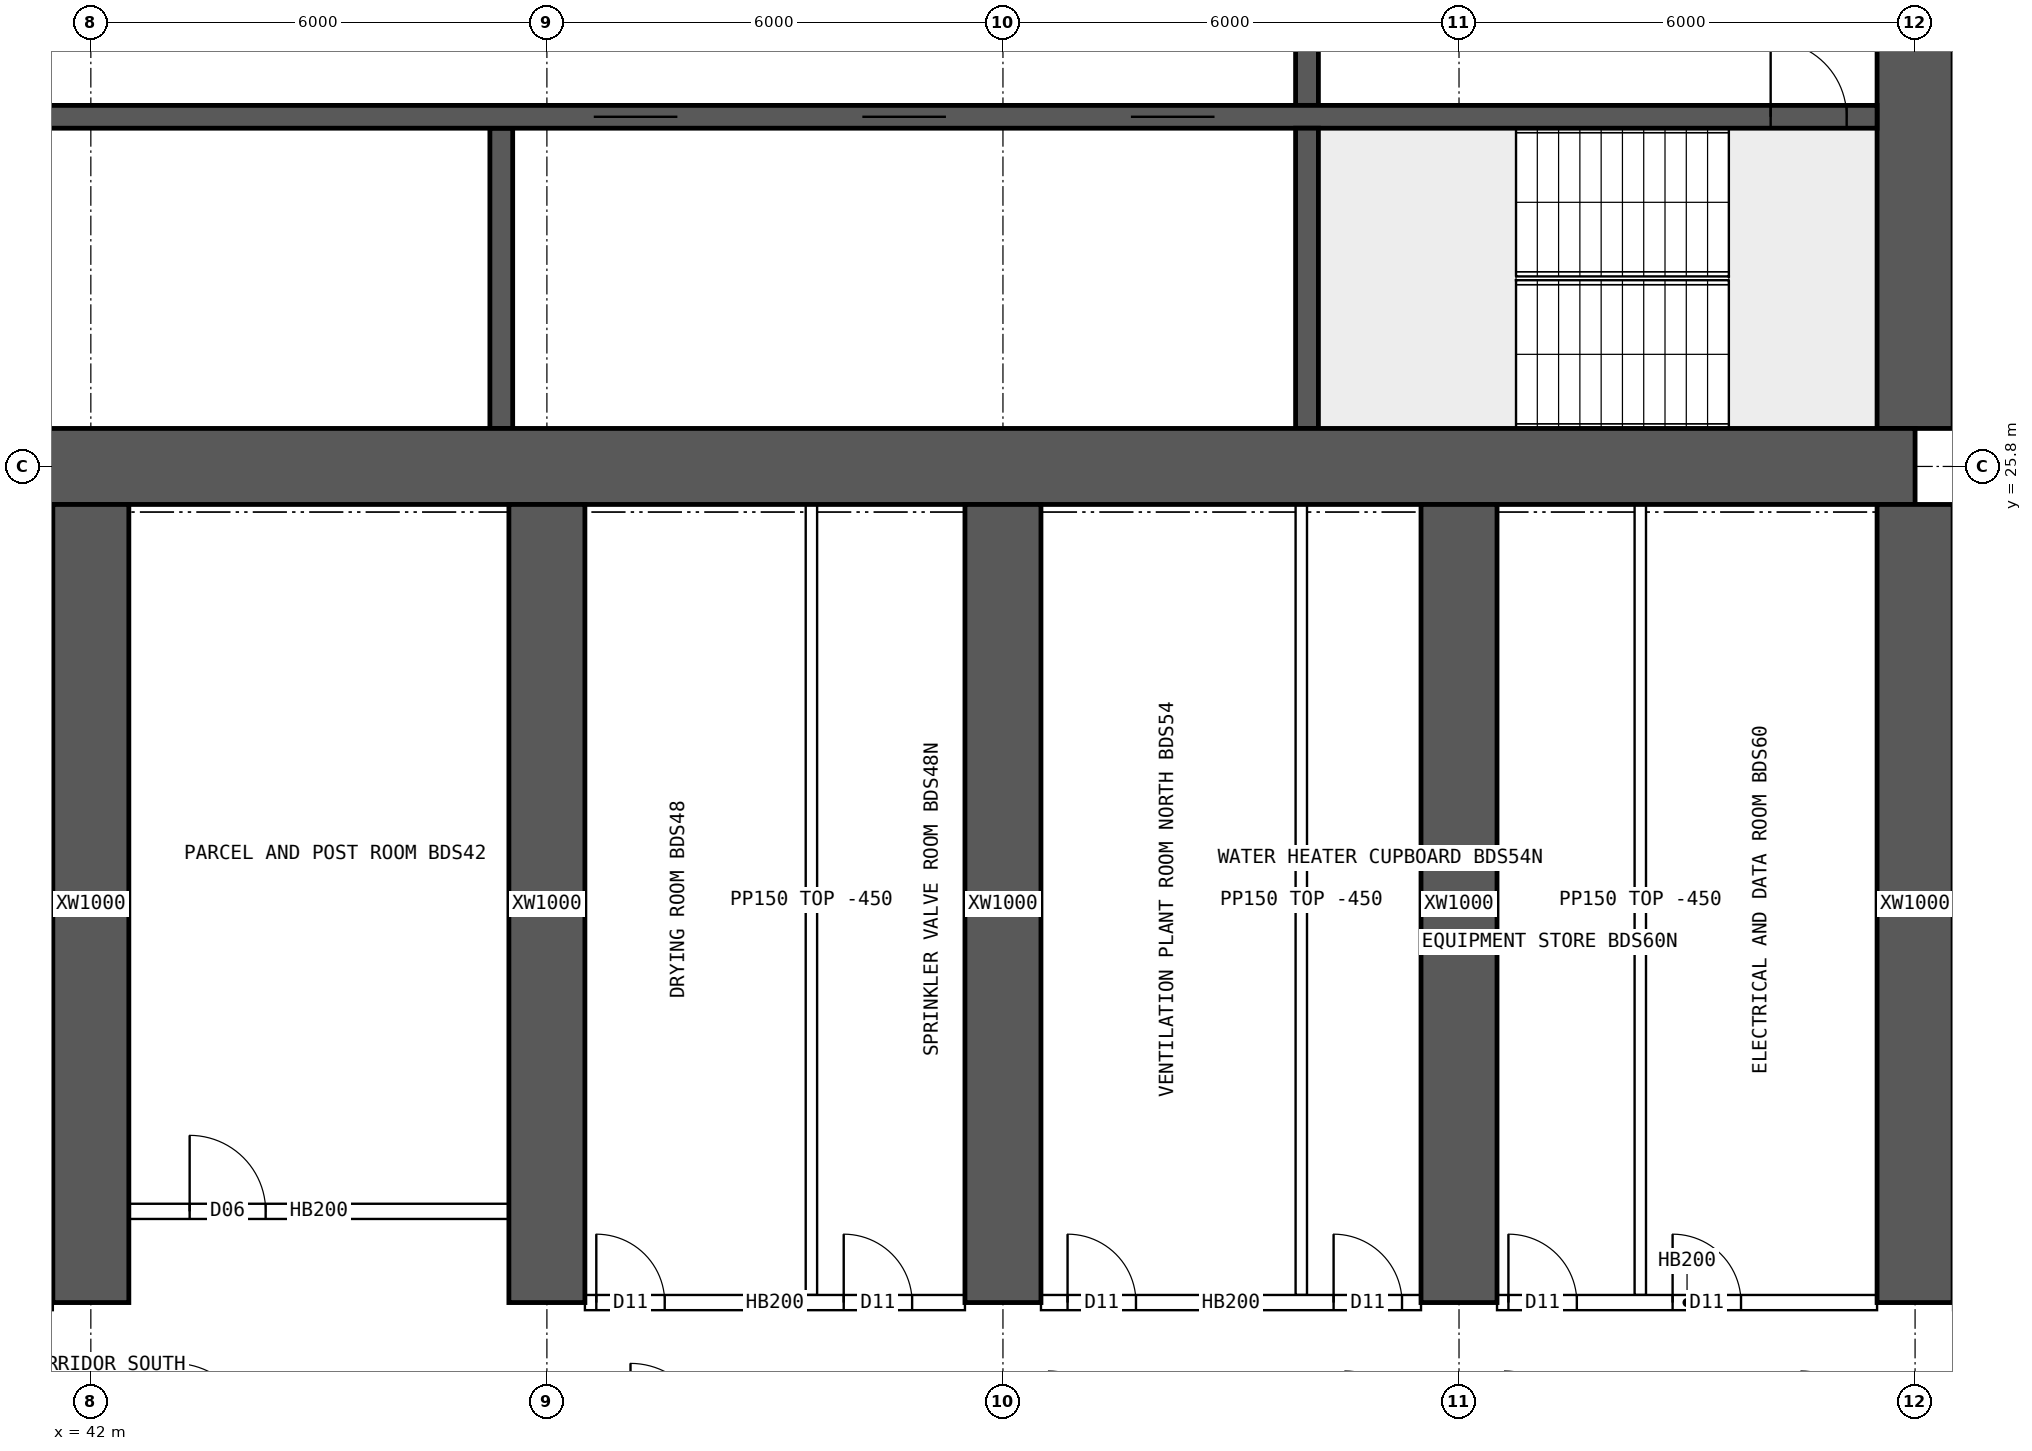
"""IFC4 building model, lengths in metres.
Left out: names, types, materials, properties, quantities, classifications, styles, units other than length and angle.
Written with IfcOpenShell. Run it as: python <this file> out.ifc"""

import sys

from ifc_helpers import new_model, si_unit, direction, frame, frame_2d, origin, place, context, subcontext, project, spatial, rectangle, extrude, element, fill, save


model = new_model("IFC4")
c1 = context("Model", 3, precision=1e-05, world=origin(), true_north=direction((0.0, 1.0)))
c2 = subcontext(c1, "Body", "Model", "MODEL_VIEW")
j1 = project(units=[si_unit("LENGTHUNIT", "METRE"), si_unit("PLANEANGLEUNIT", "RADIAN")], contexts=[c1])
p1 = place(None, origin())
s1 = spatial("IfcSite", under=j1, at=p1, CompositionType="ELEMENT")
p2 = place(p1, origin())
s2 = spatial("IfcBuilding", under=s1, at=p2, CompositionType="ELEMENT")
p3 = place(p2, frame((0.0, 0.0, 35.2)))
s3 = spatial("IfcBuildingStorey", under=s2, at=p3, CompositionType="ELEMENT", Elevation=35.2)
p4 = place(p3, frame((18.0, 25.8, 0.0), z_axis=(0.0, 0.0, 1.0), x_axis=(1.0, 0.0, 0.0)))
e1 = element("IfcWall", 1, at=p4, inside=s3, PredefinedType="SHEAR", context=c2, shape_type="SweptSolid", body=[
    extrude(rectangle(XDim=48.0, YDim=1.0, at=frame_2d((24.0, 0.0))), origin(), (0.0, 0.0, 1.0), 3.75),
])
p5 = place(p3, frame((66.0, 26.3, 0.0), z_axis=(0.0, 0.0, 1.0), x_axis=(0.0, 1.0, 0.0)))
e2 = element("IfcWall", 2, at=p5, inside=s3, PredefinedType="SHEAR", context=c2, shape_type="SweptSolid", body=[
    extrude(rectangle(XDim=11.4, YDim=1.0, at=frame_2d((5.7, 0.0))), origin(), (0.0, 0.0, 1.0), 3.75),
])
p6 = place(p5, frame((5.0, 0.0, 0.0)))
e3 = element("IfcOpeningElement", 3, at=p6, cuts=e2, PredefinedType="OPENING", context=c2, shape_type="SweptSolid", body=[
    extrude(rectangle(XDim=1.2, YDim=2.1, at=frame_2d((0.6, 1.05))), frame((0.0, 0.51, 0.0), z_axis=(0.0, -1.0, 0.0), x_axis=(1.0, 0.0, 0.0)), (0.0, 0.0, 1.0), 1.02),
])
p7 = place(p3, frame((18.5, 30.4, 0.0), z_axis=(0.0, 0.0, 1.0), x_axis=(1.0, 0.0, 0.0)))
e4 = element("IfcWall", 4, at=p7, inside=s3, PredefinedType="SHEAR", context=c2, shape_type="SweptSolid", body=[
    extrude(rectangle(XDim=47.0, YDim=0.3, at=frame_2d((23.5, 0.0))), origin(), (0.0, 0.0, 1.0), 3.75),
])
p8 = place(p7, frame((0.4, 0.0, 0.0)))
e5 = element("IfcOpeningElement", 5, at=p8, cuts=e4, PredefinedType="OPENING", context=c2, shape_type="SweptSolid", body=[
    extrude(rectangle(XDim=1.0, YDim=2.1, at=frame_2d((0.5, 1.05))), frame((0.0, 0.16, 0.0), z_axis=(0.0, -1.0, 0.0), x_axis=(1.0, 0.0, 0.0)), (0.0, 0.0, 1.0), 0.32),
])
p9 = place(p7, frame((45.6, 0.0, 0.0)))
e6 = element("IfcOpeningElement", 6, at=p9, cuts=e4, PredefinedType="OPENING", context=c2, shape_type="SweptSolid", body=[
    extrude(rectangle(XDim=1.0, YDim=2.1, at=frame_2d((0.5, 1.05))), frame((0.0, 0.16, 0.0), z_axis=(0.0, -1.0, 0.0), x_axis=(1.0, 0.0, 0.0)), (0.0, 0.0, 1.0), 0.32),
])
p10 = place(p7, frame((8.25, 0.0, 0.0)))
e7 = element("IfcOpeningElement", 7, at=p10, cuts=e4, PredefinedType="OPENING", context=c2, shape_type="SweptSolid", body=[
    extrude(rectangle(XDim=1.1, YDim=2.1, at=frame_2d((0.55, 1.05))), frame((0.0, 0.16, 0.0), z_axis=(0.0, -1.0, 0.0), x_axis=(1.0, 0.0, 0.0)), (0.0, 0.0, 1.0), 0.32),
])
p11 = place(p7, frame((10.85, 0.0, 0.0)))
e8 = element("IfcOpeningElement", 8, at=p11, cuts=e4, PredefinedType="OPENING", context=c2, shape_type="SweptSolid", body=[
    extrude(rectangle(XDim=1.1, YDim=2.1, at=frame_2d((0.55, 1.05))), frame((0.0, 0.16, 0.0), z_axis=(0.0, -1.0, 0.0), x_axis=(1.0, 0.0, 0.0)), (0.0, 0.0, 1.0), 0.32),
])
p12 = place(p7, frame((13.45, 0.0, 0.0)))
e9 = element("IfcOpeningElement", 9, at=p12, cuts=e4, PredefinedType="OPENING", context=c2, shape_type="SweptSolid", body=[
    extrude(rectangle(XDim=1.1, YDim=2.1, at=frame_2d((0.55, 1.05))), frame((0.0, 0.16, 0.0), z_axis=(0.0, -1.0, 0.0), x_axis=(1.0, 0.0, 0.0)), (0.0, 0.0, 1.0), 0.32),
])
p13 = place(p7, frame((16.05, 0.0, 0.0)))
e10 = element("IfcOpeningElement", 10, at=p13, cuts=e4, PredefinedType="OPENING", context=c2, shape_type="SweptSolid", body=[
    extrude(rectangle(XDim=1.1, YDim=2.1, at=frame_2d((0.55, 1.05))), frame((0.0, 0.16, 0.0), z_axis=(0.0, -1.0, 0.0), x_axis=(1.0, 0.0, 0.0)), (0.0, 0.0, 1.0), 0.32),
])
p14 = place(p7, frame((30.117, 0.0, 0.0)))
e11 = element("IfcOpeningElement", 11, at=p14, cuts=e4, PredefinedType="OPENING", context=c2, shape_type="SweptSolid", body=[
    extrude(rectangle(XDim=1.1, YDim=2.1, at=frame_2d((0.55, 1.05))), frame((0.0, 0.16, 0.0), z_axis=(0.0, -1.0, 0.0), x_axis=(1.0, 0.0, 0.0)), (0.0, 0.0, 1.0), 0.32),
])
p15 = place(p7, frame((33.65, 0.0, 0.0)))
e12 = element("IfcOpeningElement", 12, at=p15, cuts=e4, PredefinedType="OPENING", context=c2, shape_type="SweptSolid", body=[
    extrude(rectangle(XDim=1.1, YDim=2.1, at=frame_2d((0.55, 1.05))), frame((0.0, 0.16, 0.0), z_axis=(0.0, -1.0, 0.0), x_axis=(1.0, 0.0, 0.0)), (0.0, 0.0, 1.0), 0.32),
])
p16 = place(p7, frame((37.183, 0.0, 0.0)))
e13 = element("IfcOpeningElement", 13, at=p16, cuts=e4, PredefinedType="OPENING", context=c2, shape_type="SweptSolid", body=[
    extrude(rectangle(XDim=1.1, YDim=2.1, at=frame_2d((0.55, 1.05))), frame((0.0, 0.16, 0.0), z_axis=(0.0, -1.0, 0.0), x_axis=(1.0, 0.0, 0.0)), (0.0, 0.0, 1.0), 0.32),
])
p17 = place(p3, frame((58.0, 26.3, 0.0), z_axis=(0.0, 0.0, 1.0), x_axis=(0.0, 1.0, 0.0)))
e14 = element("IfcWall", 14, at=p17, inside=s3, PredefinedType="SHEAR", context=c2, shape_type="SweptSolid", body=[
    extrude(rectangle(XDim=3.95, YDim=0.3, at=frame_2d((1.975, 0.0))), origin(), (0.0, 0.0, 1.0), 3.75),
])
p18 = place(p3, frame((58.0, 30.55, 0.0), z_axis=(0.0, 0.0, 1.0), x_axis=(0.0, 1.0, 0.0)))
e15 = element("IfcWall", 15, at=p18, inside=s3, PredefinedType="SHEAR", context=c2, shape_type="SweptSolid", body=[
    extrude(rectangle(XDim=3.9, YDim=0.3, at=frame_2d((1.95, 0.0))), origin(), (0.0, 0.0, 1.0), 3.75),
])
p19 = place(p18, frame((1.4, 0.0, 0.0)))
e16 = element("IfcOpeningElement", 16, at=p19, cuts=e15, PredefinedType="OPENING", context=c2, shape_type="SweptSolid", body=[
    extrude(rectangle(XDim=1.2, YDim=2.1, at=frame_2d((0.6, 1.05))), frame((0.0, 0.16, 0.0), z_axis=(0.0, -1.0, 0.0), x_axis=(1.0, 0.0, 0.0)), (0.0, 0.0, 1.0), 0.32),
])
p20 = place(p3, frame((47.4, 26.3, 0.0), z_axis=(0.0, 0.0, 1.0), x_axis=(0.0, 1.0, 0.0)))
e17 = element("IfcWall", 17, at=p20, inside=s3, PredefinedType="SHEAR", context=c2, shape_type="SweptSolid", body=[
    extrude(rectangle(XDim=3.95, YDim=0.3, at=frame_2d((1.975, 0.0))), origin(), (0.0, 0.0, 1.0), 3.75),
])
for number, where, z_axis, x_axis in (
    (18, (42.0, 14.8, 0.0), (0.0, 0.0, 1.0), (0.0, 1.0, 0.0)),
    (19, (48.0, 14.8, 0.0), (0.0, 0.0, 1.0), (0.0, 1.0, 0.0)),
    (20, (54.0, 14.8, 0.0), (0.0, 0.0, 1.0), (0.0, 1.0, 0.0)),
    (21, (60.0, 14.8, 0.0), (0.0, 0.0, 1.0), (0.0, 1.0, 0.0)),
    (22, (66.0, 14.8, 0.0), (0.0, 0.0, 1.0), (0.0, 1.0, 0.0)),
):
    element("IfcWall", number, at=place(p3, frame(where, z_axis=z_axis, x_axis=x_axis)), inside=s3, PredefinedType="SHEAR", context=c2, shape_type="SweptSolid", body=[
        extrude(rectangle(XDim=10.5, YDim=1.0, at=frame_2d((5.25, 0.0))), origin(), (0.0, 0.0, 1.0), 3.75),
    ])
p21 = place(p3, frame((48.5, 14.8, 0.0), z_axis=(0.0, 0.0, 1.0), x_axis=(1.0, 0.0, 0.0)))
e23 = element("IfcWall", 23, at=p21, inside=s3, PredefinedType="SOLIDWALL", context=c2, shape_type="SweptSolid", body=[
    extrude(rectangle(XDim=5.0, YDim=0.2, at=frame_2d((2.5, 0.0))), origin(), (0.0, 0.0, 1.0), 3.3),
])
p22 = place(p21, frame((0.15, 0.0, 0.0)))
e24 = element("IfcOpeningElement", 24, at=p22, cuts=e23, PredefinedType="OPENING", context=c2, shape_type="SweptSolid", body=[
    extrude(rectangle(XDim=0.9, YDim=2.1, at=frame_2d((0.45, 1.05))), frame((0.0, 0.11, 0.0), z_axis=(0.0, -1.0, 0.0), x_axis=(1.0, 0.0, 0.0)), (0.0, 0.0, 1.0), 0.22),
])
p23 = place(p21, frame((3.405, 0.0, 0.0)))
e25 = element("IfcOpeningElement", 25, at=p23, cuts=e23, PredefinedType="OPENING", context=c2, shape_type="SweptSolid", body=[
    extrude(rectangle(XDim=0.9, YDim=2.1, at=frame_2d((0.45, 1.05))), frame((0.0, 0.11, 0.0), z_axis=(0.0, -1.0, 0.0), x_axis=(1.0, 0.0, 0.0)), (0.0, 0.0, 1.0), 0.22),
])
p24 = place(p3, frame((54.5, 14.8, 0.0), z_axis=(0.0, 0.0, 1.0), x_axis=(1.0, 0.0, 0.0)))
e26 = element("IfcWall", 26, at=p24, inside=s3, PredefinedType="SOLIDWALL", context=c2, shape_type="SweptSolid", body=[
    extrude(rectangle(XDim=5.0, YDim=0.2, at=frame_2d((2.5, 0.0))), origin(), (0.0, 0.0, 1.0), 3.3),
])
p25 = place(p24, frame((0.35, 0.0, 0.0)))
e27 = element("IfcOpeningElement", 27, at=p25, cuts=e26, PredefinedType="OPENING", context=c2, shape_type="SweptSolid", body=[
    extrude(rectangle(XDim=0.9, YDim=2.1, at=frame_2d((0.45, 1.05))), frame((0.0, 0.11, 0.0), z_axis=(0.0, -1.0, 0.0), x_axis=(1.0, 0.0, 0.0)), (0.0, 0.0, 1.0), 0.22),
])
p26 = place(p24, frame((3.85, 0.0, 0.0)))
e28 = element("IfcOpeningElement", 28, at=p26, cuts=e26, PredefinedType="OPENING", context=c2, shape_type="SweptSolid", body=[
    extrude(rectangle(XDim=0.9, YDim=2.1, at=frame_2d((0.45, 1.05))), frame((0.0, 0.11, 0.0), z_axis=(0.0, -1.0, 0.0), x_axis=(1.0, 0.0, 0.0)), (0.0, 0.0, 1.0), 0.22),
])
p27 = place(p3, frame((60.5, 14.8, 0.0), z_axis=(0.0, 0.0, 1.0), x_axis=(1.0, 0.0, 0.0)))
e29 = element("IfcWall", 29, at=p27, inside=s3, PredefinedType="SOLIDWALL", context=c2, shape_type="SweptSolid", body=[
    extrude(rectangle(XDim=5.0, YDim=0.2, at=frame_2d((2.5, 0.0))), origin(), (0.0, 0.0, 1.0), 3.3),
])
p28 = place(p27, frame((0.15, 0.0, 0.0)))
e30 = element("IfcOpeningElement", 30, at=p28, cuts=e29, PredefinedType="OPENING", context=c2, shape_type="SweptSolid", body=[
    extrude(rectangle(XDim=0.9, YDim=2.1, at=frame_2d((0.45, 1.05))), frame((0.0, 0.11, 0.0), z_axis=(0.0, -1.0, 0.0), x_axis=(1.0, 0.0, 0.0)), (0.0, 0.0, 1.0), 0.22),
])
p29 = place(p27, frame((2.31, 0.0, 0.0)))
e31 = element("IfcOpeningElement", 31, at=p29, cuts=e29, PredefinedType="OPENING", context=c2, shape_type="SweptSolid", body=[
    extrude(rectangle(XDim=0.9, YDim=2.1, at=frame_2d((0.45, 1.05))), frame((0.0, 0.11, 0.0), z_axis=(0.0, -1.0, 0.0), x_axis=(1.0, 0.0, 0.0)), (0.0, 0.0, 1.0), 0.22),
])
p30 = place(p3, frame((42.5, 16.0, 0.0), z_axis=(0.0, 0.0, 1.0), x_axis=(1.0, 0.0, 0.0)))
e32 = element("IfcWall", 32, at=p30, inside=s3, PredefinedType="SOLIDWALL", context=c2, shape_type="SweptSolid", body=[
    extrude(rectangle(XDim=5.0, YDim=0.2, at=frame_2d((2.5, 0.0))), origin(), (0.0, 0.0, 1.0), 3.3),
])
p31 = place(p30, frame((0.8, 0.0, 0.0)))
e33 = element("IfcOpeningElement", 33, at=p31, cuts=e32, PredefinedType="OPENING", context=c2, shape_type="SweptSolid", body=[
    extrude(rectangle(XDim=1.0, YDim=2.1, at=frame_2d((0.5, 1.05))), frame((0.0, 0.11, 0.0), z_axis=(0.0, -1.0, 0.0), x_axis=(1.0, 0.0, 0.0)), (0.0, 0.0, 1.0), 0.22),
])
for number, where, z_axis, x_axis in (
    (34, (51.48, 14.9, 0.0), (0.0, 0.0, 1.0), (0.0, 1.0, 0.0)),
    (35, (57.925, 14.9, 0.0), (0.0, 0.0, 1.0), (0.0, 1.0, 0.0)),
    (36, (62.385, 14.9, 0.0), (0.0, 0.0, 1.0), (0.0, 1.0, 0.0)),
):
    element("IfcWall", number, at=place(p3, frame(where, z_axis=z_axis, x_axis=x_axis)), inside=s3, PredefinedType="PARTITIONING", context=c2, shape_type="SweptSolid", body=[
        extrude(rectangle(XDim=10.4, YDim=0.15, at=frame_2d((5.2, 0.0))), origin(), (0.0, 0.0, 1.0), 3.3),
    ])
p32 = place(p9, origin())
e37 = element("IfcDoor", 37, at=p32, inside=s3, OperationType="SINGLE_SWING_LEFT", PredefinedType="DOOR", context=c2, shape_type="SweptSolid", body=[
    extrude(rectangle(XDim=1.0, YDim=2.1, at=frame_2d((0.5, 1.05))), frame((0.0, 0.025, 0.0), z_axis=(0.0, -1.0, 0.0), x_axis=(1.0, 0.0, 0.0)), (0.0, 0.0, 1.0), 0.05),
])
fill(e6, e37)
p33 = place(p14, origin())
e38 = element("IfcDoor", 38, at=p33, inside=s3, OperationType="DOUBLE_DOOR_SLIDING", PredefinedType="DOOR", context=c2, shape_type="SweptSolid", body=[
    extrude(rectangle(XDim=1.1, YDim=2.1, at=frame_2d((0.55, 1.05))), frame((0.0, 0.025, 0.0), z_axis=(0.0, -1.0, 0.0), x_axis=(1.0, 0.0, 0.0)), (0.0, 0.0, 1.0), 0.05),
])
fill(e11, e38)
p34 = place(p15, origin())
e39 = element("IfcDoor", 39, at=p34, inside=s3, OperationType="DOUBLE_DOOR_SLIDING", PredefinedType="DOOR", context=c2, shape_type="SweptSolid", body=[
    extrude(rectangle(XDim=1.1, YDim=2.1, at=frame_2d((0.55, 1.05))), frame((0.0, 0.025, 0.0), z_axis=(0.0, -1.0, 0.0), x_axis=(1.0, 0.0, 0.0)), (0.0, 0.0, 1.0), 0.05),
])
fill(e12, e39)
p35 = place(p16, origin())
e40 = element("IfcDoor", 40, at=p35, inside=s3, OperationType="DOUBLE_DOOR_SLIDING", PredefinedType="DOOR", context=c2, shape_type="SweptSolid", body=[
    extrude(rectangle(XDim=1.1, YDim=2.1, at=frame_2d((0.55, 1.05))), frame((0.0, 0.025, 0.0), z_axis=(0.0, -1.0, 0.0), x_axis=(1.0, 0.0, 0.0)), (0.0, 0.0, 1.0), 0.05),
])
fill(e13, e40)
p36 = place(p31, origin())
e41 = element("IfcDoor", 41, at=p36, inside=s3, OperationType="SINGLE_SWING_LEFT", PredefinedType="DOOR", context=c2, shape_type="SweptSolid", body=[
    extrude(rectangle(XDim=1.0, YDim=2.1, at=frame_2d((0.5, 1.05))), frame((0.0, 0.025, 0.0), z_axis=(0.0, -1.0, 0.0), x_axis=(1.0, 0.0, 0.0)), (0.0, 0.0, 1.0), 0.05),
])
fill(e33, e41)
p37 = place(p22, origin())
e42 = element("IfcDoor", 42, at=p37, inside=s3, OperationType="SINGLE_SWING_LEFT", PredefinedType="DOOR", context=c2, shape_type="SweptSolid", body=[
    extrude(rectangle(XDim=0.9, YDim=2.1, at=frame_2d((0.45, 1.05))), frame((0.0, 0.025, 0.0), z_axis=(0.0, -1.0, 0.0), x_axis=(1.0, 0.0, 0.0)), (0.0, 0.0, 1.0), 0.05),
])
fill(e24, e42)
p38 = place(p23, origin())
e43 = element("IfcDoor", 43, at=p38, inside=s3, OperationType="SINGLE_SWING_LEFT", PredefinedType="DOOR", context=c2, shape_type="SweptSolid", body=[
    extrude(rectangle(XDim=0.9, YDim=2.1, at=frame_2d((0.45, 1.05))), frame((0.0, 0.025, 0.0), z_axis=(0.0, -1.0, 0.0), x_axis=(1.0, 0.0, 0.0)), (0.0, 0.0, 1.0), 0.05),
])
fill(e25, e43)
p39 = place(p25, origin())
e44 = element("IfcDoor", 44, at=p39, inside=s3, OperationType="SINGLE_SWING_LEFT", PredefinedType="DOOR", context=c2, shape_type="SweptSolid", body=[
    extrude(rectangle(XDim=0.9, YDim=2.1, at=frame_2d((0.45, 1.05))), frame((0.0, 0.025, 0.0), z_axis=(0.0, -1.0, 0.0), x_axis=(1.0, 0.0, 0.0)), (0.0, 0.0, 1.0), 0.05),
])
fill(e27, e44)
p40 = place(p26, origin())
e45 = element("IfcDoor", 45, at=p40, inside=s3, OperationType="SINGLE_SWING_LEFT", PredefinedType="DOOR", context=c2, shape_type="SweptSolid", body=[
    extrude(rectangle(XDim=0.9, YDim=2.1, at=frame_2d((0.45, 1.05))), frame((0.0, 0.025, 0.0), z_axis=(0.0, -1.0, 0.0), x_axis=(1.0, 0.0, 0.0)), (0.0, 0.0, 1.0), 0.05),
])
fill(e28, e45)
p41 = place(p28, origin())
e46 = element("IfcDoor", 46, at=p41, inside=s3, OperationType="SINGLE_SWING_LEFT", PredefinedType="DOOR", context=c2, shape_type="SweptSolid", body=[
    extrude(rectangle(XDim=0.9, YDim=2.1, at=frame_2d((0.45, 1.05))), frame((0.0, 0.025, 0.0), z_axis=(0.0, -1.0, 0.0), x_axis=(1.0, 0.0, 0.0)), (0.0, 0.0, 1.0), 0.05),
])
fill(e30, e46)
p42 = place(p29, origin())
e47 = element("IfcDoor", 47, at=p42, inside=s3, OperationType="SINGLE_SWING_LEFT", PredefinedType="DOOR", context=c2, shape_type="SweptSolid", body=[
    extrude(rectangle(XDim=0.9, YDim=2.1, at=frame_2d((0.45, 1.05))), frame((0.0, 0.025, 0.0), z_axis=(0.0, -1.0, 0.0), x_axis=(1.0, 0.0, 0.0)), (0.0, 0.0, 1.0), 0.05),
])
fill(e31, e47)
save(model, sys.argv[1])
